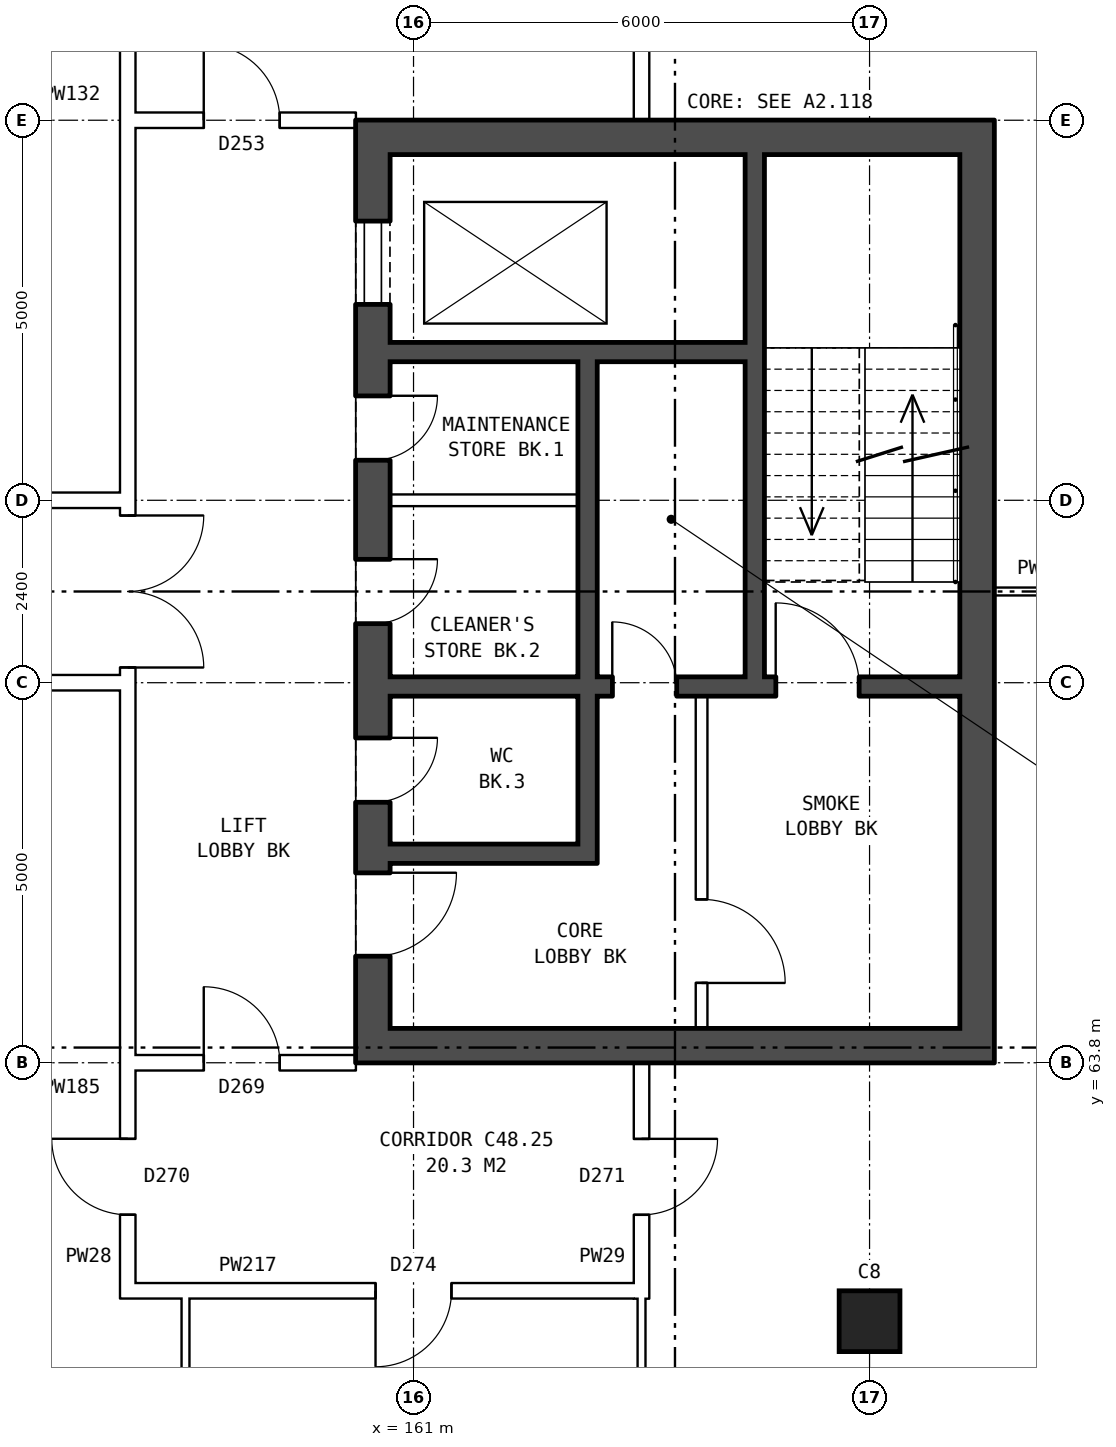
"""IFC4 building model, lengths in metres.
Left out: names, types, materials, properties, quantities, classifications, styles, units other than length and angle.
Written with IfcOpenShell. Run it as: python <this file> out.ifc"""

import sys

from ifc_helpers import new_model, si_unit, direction, frame, frame_2d, origin, origin_2d, place, context, subcontext, project, spatial, rectangle, extrude, element, fill, save


model = new_model("IFC4")
c1 = context("Model", 3, precision=1e-05, world=origin(), true_north=direction((0.0, 1.0)))
c2 = subcontext(c1, "Body", "Model", "MODEL_VIEW")
j1 = project(units=[si_unit("LENGTHUNIT", "METRE"), si_unit("PLANEANGLEUNIT", "RADIAN")], contexts=[c1])
p1 = place(None, origin())
s1 = spatial("IfcSite", under=j1, at=p1, CompositionType="ELEMENT")
p2 = place(p1, origin())
s2 = spatial("IfcBuilding", under=s1, at=p2, CompositionType="ELEMENT")
p3 = place(p2, frame((0.0, 0.0, 171.6)))
s3 = spatial("IfcBuildingStorey", under=s2, at=p3, CompositionType="ELEMENT", Elevation=171.6)
p4 = place(p3, frame((167.0, 60.4, 0.0), z_axis=(0.0, 0.0, 1.0), x_axis=(1.0, 0.0, 0.0)))
e1 = element("IfcColumn", 1, at=p4, inside=s3, PredefinedType="COLUMN", context=c2, shape_type="SweptSolid", body=[
    extrude(rectangle(XDim=0.8, YDim=0.8, at=origin_2d()), origin(), (0.0, 0.0, 1.0), 3.6),
])
p5 = place(p3, frame((160.465, 76.2, 0.0), z_axis=(0.0, 0.0, 1.0), x_axis=(0.0, -1.0, 0.0)))
e2 = element("IfcWall", 2, at=p5, inside=s3, PredefinedType="SHEAR", context=c2, shape_type="SweptSolid", body=[
    extrude(rectangle(XDim=12.4, YDim=0.45, at=frame_2d((6.2, 0.0))), origin(), (0.0, 0.0, 1.0), 3.6),
])
p6 = place(p5, frame((1.325, 0.0, 0.0)))
e3 = element("IfcOpeningElement", 3, at=p6, cuts=e2, PredefinedType="OPENING", context=c2, shape_type="SweptSolid", body=[
    extrude(rectangle(XDim=1.1, YDim=2.1, at=frame_2d((0.55, 1.05))), frame((0.0, 0.235, 0.0), z_axis=(0.0, -1.0, 0.0), x_axis=(1.0, 0.0, 0.0)), (0.0, 0.0, 1.0), 0.47),
])
p7 = place(p5, frame((3.625, 0.0, 0.0)))
e4 = element("IfcOpeningElement", 4, at=p7, cuts=e2, PredefinedType="OPENING", context=c2, shape_type="SweptSolid", body=[
    extrude(rectangle(XDim=0.85, YDim=2.1, at=frame_2d((0.425, 1.05))), frame((0.0, 0.235, 0.0), z_axis=(0.0, -1.0, 0.0), x_axis=(1.0, 0.0, 0.0)), (0.0, 0.0, 1.0), 0.47),
])
p8 = place(p5, frame((5.775, 0.0, 0.0)))
e5 = element("IfcOpeningElement", 5, at=p8, cuts=e2, PredefinedType="OPENING", context=c2, shape_type="SweptSolid", body=[
    extrude(rectangle(XDim=0.85, YDim=2.1, at=frame_2d((0.425, 1.05))), frame((0.0, 0.235, 0.0), z_axis=(0.0, -1.0, 0.0), x_axis=(1.0, 0.0, 0.0)), (0.0, 0.0, 1.0), 0.47),
])
p9 = place(p5, frame((9.9, 0.0, 0.0)))
e6 = element("IfcOpeningElement", 6, at=p9, cuts=e2, PredefinedType="OPENING", context=c2, shape_type="SweptSolid", body=[
    extrude(rectangle(XDim=1.1, YDim=2.1, at=frame_2d((0.55, 1.05))), frame((0.0, 0.235, 0.0), z_axis=(0.0, -1.0, 0.0), x_axis=(1.0, 0.0, 0.0)), (0.0, 0.0, 1.0), 0.47),
])
p10 = place(p5, frame((8.125, 0.0, 0.0)))
e7 = element("IfcOpeningElement", 7, at=p10, cuts=e2, PredefinedType="OPENING", context=c2, shape_type="SweptSolid", body=[
    extrude(rectangle(XDim=0.85, YDim=2.1, at=frame_2d((0.425, 1.05))), frame((0.0, 0.235, 0.0), z_axis=(0.0, -1.0, 0.0), x_axis=(1.0, 0.0, 0.0)), (0.0, 0.0, 1.0), 0.47),
])
p11 = place(p3, frame((168.415, 76.2, 0.0), z_axis=(0.0, 0.0, 1.0), x_axis=(0.0, -1.0, 0.0)))
e8 = element("IfcWall", 8, at=p11, inside=s3, PredefinedType="SHEAR", context=c2, shape_type="SweptSolid", body=[
    extrude(rectangle(XDim=12.4, YDim=0.45, at=frame_2d((6.2, 0.0))), origin(), (0.0, 0.0, 1.0), 3.6),
])
for number, where, z_axis, x_axis in (
    (9, (160.69, 75.975, 0.0), (0.0, 0.0, 1.0), (1.0, 0.0, 0.0)),
    (10, (160.69, 64.025, 0.0), (0.0, 0.0, 1.0), (1.0, 0.0, 0.0)),
):
    element("IfcWall", number, at=place(p3, frame(where, z_axis=z_axis, x_axis=x_axis)), inside=s3, PredefinedType="SHEAR", context=c2, shape_type="SweptSolid", body=[
        extrude(rectangle(XDim=7.5, YDim=0.45, at=frame_2d((3.75, 0.0))), origin(), (0.0, 0.0, 1.0), 3.6),
    ])
p12 = place(p3, frame((160.69, 73.15, 0.0), z_axis=(0.0, 0.0, 1.0), x_axis=(1.0, 0.0, 0.0)))
e11 = element("IfcWall", 11, at=p12, inside=s3, PredefinedType="SHEAR", context=c2, shape_type="SweptSolid", body=[
    extrude(rectangle(XDim=4.675, YDim=0.25, at=frame_2d((2.337, 0.0))), origin(), (0.0, 0.0, 1.0), 3.6),
])
p13 = place(p3, frame((160.69, 71.2, 0.0), z_axis=(0.0, 0.0, 1.0), x_axis=(1.0, 0.0, 0.0)))
e12 = element("IfcWall", 12, at=p13, inside=s3, PredefinedType="PARTITIONING", context=c2, shape_type="SweptSolid", body=[
    extrude(rectangle(XDim=2.475, YDim=0.15, at=frame_2d((1.238, 0.0))), origin(), (0.0, 0.0, 1.0), 3.6),
])
p14 = place(p3, frame((160.69, 68.75, 0.0), z_axis=(0.0, 0.0, 1.0), x_axis=(1.0, 0.0, 0.0)))
e13 = element("IfcWall", 13, at=p14, inside=s3, PredefinedType="SHEAR", context=c2, shape_type="SweptSolid", body=[
    extrude(rectangle(XDim=7.5, YDim=0.25, at=frame_2d((3.75, 0.0))), origin(), (0.0, 0.0, 1.0), 3.6),
])
p15 = place(p14, frame((5.075, 0.0, 0.0)))
e14 = element("IfcOpeningElement", 14, at=p15, cuts=e13, PredefinedType="OPENING", context=c2, shape_type="SweptSolid", body=[
    extrude(rectangle(XDim=1.1, YDim=2.1, at=frame_2d((0.55, 1.05))), frame((0.0, 0.135, 0.0), z_axis=(0.0, -1.0, 0.0), x_axis=(1.0, 0.0, 0.0)), (0.0, 0.0, 1.0), 0.27),
])
p16 = place(p14, frame((2.925, 0.0, 0.0)))
e15 = element("IfcOpeningElement", 15, at=p16, cuts=e13, PredefinedType="OPENING", context=c2, shape_type="SweptSolid", body=[
    extrude(rectangle(XDim=0.85, YDim=2.1, at=frame_2d((0.425, 1.05))), frame((0.0, 0.135, 0.0), z_axis=(0.0, -1.0, 0.0), x_axis=(1.0, 0.0, 0.0)), (0.0, 0.0, 1.0), 0.27),
])
p17 = place(p3, frame((160.69, 66.55, 0.0), z_axis=(0.0, 0.0, 1.0), x_axis=(1.0, 0.0, 0.0)))
e16 = element("IfcWall", 16, at=p17, inside=s3, PredefinedType="SHEAR", context=c2, shape_type="SweptSolid", body=[
    extrude(rectangle(XDim=2.475, YDim=0.25, at=frame_2d((1.238, 0.0))), origin(), (0.0, 0.0, 1.0), 3.6),
])
p18 = place(p3, frame((163.29, 73.025, 0.0), z_axis=(0.0, 0.0, 1.0), x_axis=(0.0, -1.0, 0.0)))
e17 = element("IfcWall", 17, at=p18, inside=s3, PredefinedType="SHEAR", context=c2, shape_type="SweptSolid", body=[
    extrude(rectangle(XDim=4.15, YDim=0.25, at=frame_2d((2.075, 0.0))), origin(), (0.0, 0.0, 1.0), 3.6),
])
p19 = place(p3, frame((163.29, 68.625, 0.0), z_axis=(0.0, 0.0, 1.0), x_axis=(0.0, -1.0, 0.0)))
e18 = element("IfcWall", 18, at=p19, inside=s3, PredefinedType="SHEAR", context=c2, shape_type="SweptSolid", body=[
    extrude(rectangle(XDim=2.2, YDim=0.25, at=frame_2d((1.1, 0.0))), origin(), (0.0, 0.0, 1.0), 3.6),
])
p20 = place(p3, frame((164.79, 68.625, 0.0), z_axis=(0.0, 0.0, 1.0), x_axis=(0.0, -1.0, 0.0)))
e19 = element("IfcWall", 19, at=p20, inside=s3, PredefinedType="PARTITIONING", context=c2, shape_type="SweptSolid", body=[
    extrude(rectangle(XDim=4.375, YDim=0.15, at=frame_2d((2.188, 0.0))), origin(), (0.0, 0.0, 1.0), 3.6),
])
p21 = place(p20, frame((2.675, 0.0, 0.0)))
e20 = element("IfcOpeningElement", 20, at=p21, cuts=e19, PredefinedType="OPENING", context=c2, shape_type="SweptSolid", body=[
    extrude(rectangle(XDim=1.1, YDim=2.1, at=frame_2d((0.55, 1.05))), frame((0.0, 0.085, 0.0), z_axis=(0.0, -1.0, 0.0), x_axis=(1.0, 0.0, 0.0)), (0.0, 0.0, 1.0), 0.17),
])
p22 = place(p3, frame((165.49, 75.75, 0.0), z_axis=(0.0, 0.0, 1.0), x_axis=(0.0, -1.0, 0.0)))
e21 = element("IfcWall", 21, at=p22, inside=s3, PredefinedType="SHEAR", context=c2, shape_type="SweptSolid", body=[
    extrude(rectangle(XDim=6.875, YDim=0.25, at=frame_2d((3.438, 0.0))), origin(), (0.0, 0.0, 1.0), 3.6),
])
p23 = place(p3, frame((157.24, 63.9, 0.0), z_axis=(0.0, 0.0, 1.0), x_axis=(0.0, 1.0, 0.0)))
e22 = element("IfcWall", 22, at=p23, inside=s3, PredefinedType="PARTITIONING", context=c2, shape_type="SweptSolid", body=[
    extrude(rectangle(XDim=12.2, YDim=0.2, at=frame_2d((6.1, 0.0))), origin(), (0.0, 0.0, 1.0), 3.6),
])
p24 = place(p23, frame((5.1, 0.0, 0.0)))
e23 = element("IfcOpeningElement", 23, at=p24, cuts=e22, PredefinedType="OPENING", context=c2, shape_type="SweptSolid", body=[
    extrude(rectangle(XDim=2.0, YDim=2.1, at=frame_2d((1.0, 1.05))), frame((0.0, 0.11, 0.0), z_axis=(0.0, -1.0, 0.0), x_axis=(1.0, 0.0, 0.0)), (0.0, 0.0, 1.0), 0.22),
])
p25 = place(p3, frame((157.14, 60.8, 0.0), z_axis=(0.0, 0.0, 1.0), x_axis=(1.0, 0.0, 0.0)))
e24 = element("IfcWall", 24, at=p25, inside=s3, PredefinedType="PARTITIONING", context=c2, shape_type="SweptSolid", body=[
    extrude(rectangle(XDim=6.96, YDim=0.2, at=frame_2d((3.48, 0.0))), origin(), (0.0, 0.0, 1.0), 3.6),
])
p26 = place(p25, frame((3.36, 0.0, 0.0)))
e25 = element("IfcOpeningElement", 25, at=p26, cuts=e24, PredefinedType="OPENING", context=c2, shape_type="SweptSolid", body=[
    extrude(rectangle(XDim=1.0, YDim=2.1, at=frame_2d((0.5, 1.05))), frame((0.0, 0.11, 0.0), z_axis=(0.0, -1.0, 0.0), x_axis=(1.0, 0.0, 0.0)), (0.0, 0.0, 1.0), 0.22),
])
p27 = place(p3, frame((157.14, 63.8, 0.0), z_axis=(0.0, 0.0, 1.0), x_axis=(1.0, 0.0, 0.0)))
e26 = element("IfcWall", 26, at=p27, inside=s3, PredefinedType="PARTITIONING", context=c2, shape_type="SweptSolid", body=[
    extrude(rectangle(XDim=3.1, YDim=0.2, at=frame_2d((1.55, 0.0))), origin(), (0.0, 0.0, 1.0), 3.6),
])
p28 = place(p27, frame((1.1, 0.0, 0.0)))
e27 = element("IfcOpeningElement", 27, at=p28, cuts=e26, PredefinedType="OPENING", context=c2, shape_type="SweptSolid", body=[
    extrude(rectangle(XDim=1.0, YDim=2.1, at=frame_2d((0.5, 1.05))), frame((0.0, 0.11, 0.0), z_axis=(0.0, -1.0, 0.0), x_axis=(1.0, 0.0, 0.0)), (0.0, 0.0, 1.0), 0.22),
])
p29 = place(p3, frame((142.76, 68.8, 0.0), z_axis=(0.0, 0.0, 1.0), x_axis=(1.0, 0.0, 0.0)))
e28 = element("IfcWall", 28, at=p29, inside=s3, PredefinedType="PARTITIONING", context=c2, shape_type="SweptSolid", body=[
    extrude(rectangle(XDim=14.48, YDim=0.2, at=frame_2d((7.24, 0.0))), origin(), (0.0, 0.0, 1.0), 3.6),
])
p30 = place(p29, frame((3.02, 0.0, 0.0)))
e29 = element("IfcOpeningElement", 29, at=p30, cuts=e28, PredefinedType="OPENING", context=c2, shape_type="SweptSolid", body=[
    extrude(rectangle(XDim=1.2, YDim=2.1, at=frame_2d((0.6, 1.05))), frame((0.0, 0.11, 0.0), z_axis=(0.0, -1.0, 0.0), x_axis=(1.0, 0.0, 0.0)), (0.0, 0.0, 1.0), 0.22),
])
p31 = place(p3, frame((168.64, 70.0, 0.0), z_axis=(0.0, 0.0, 1.0), x_axis=(1.0, 0.0, 0.0)))
e30 = element("IfcWall", 30, at=p31, inside=s3, PredefinedType="PARTITIONING", context=c2, shape_type="SweptSolid", body=[
    extrude(rectangle(XDim=1.37, YDim=0.1, at=frame_2d((0.685, 0.0))), origin(), (0.0, 0.0, 1.0), 3.6),
])
p32 = place(p3, frame((142.76, 71.2, 0.0), z_axis=(0.0, 0.0, 1.0), x_axis=(1.0, 0.0, 0.0)))
e31 = element("IfcWall", 31, at=p32, inside=s3, PredefinedType="PARTITIONING", context=c2, shape_type="SweptSolid", body=[
    extrude(rectangle(XDim=14.48, YDim=0.2, at=frame_2d((7.24, 0.0))), origin(), (0.0, 0.0, 1.0), 3.6),
])
p33 = place(p3, frame((157.14, 76.2, 0.0), z_axis=(0.0, 0.0, 1.0), x_axis=(1.0, 0.0, 0.0)))
e32 = element("IfcWall", 32, at=p33, inside=s3, PredefinedType="PARTITIONING", context=c2, shape_type="SweptSolid", body=[
    extrude(rectangle(XDim=3.1, YDim=0.2, at=frame_2d((1.55, 0.0))), origin(), (0.0, 0.0, 1.0), 3.6),
])
p34 = place(p33, frame((1.1, 0.0, 0.0)))
e33 = element("IfcOpeningElement", 33, at=p34, cuts=e32, PredefinedType="OPENING", context=c2, shape_type="SweptSolid", body=[
    extrude(rectangle(XDim=1.0, YDim=2.1, at=frame_2d((0.5, 1.05))), frame((0.0, 0.11, 0.0), z_axis=(0.0, -1.0, 0.0), x_axis=(1.0, 0.0, 0.0)), (0.0, 0.0, 1.0), 0.22),
])
p35 = place(p3, frame((157.24, 60.7, 0.0), z_axis=(0.0, 0.0, 1.0), x_axis=(0.0, 1.0, 0.0)))
e34 = element("IfcWall", 34, at=p35, inside=s3, PredefinedType="PARTITIONING", context=c2, shape_type="SweptSolid", body=[
    extrude(rectangle(XDim=3.2, YDim=0.2, at=frame_2d((1.6, 0.0))), origin(), (0.0, 0.0, 1.0), 3.6),
])
p36 = place(p35, frame((1.1, 0.0, 0.0)))
e35 = element("IfcOpeningElement", 35, at=p36, cuts=e34, PredefinedType="OPENING", context=c2, shape_type="SweptSolid", body=[
    extrude(rectangle(XDim=1.0, YDim=2.1, at=frame_2d((0.5, 1.05))), frame((0.0, 0.11, 0.0), z_axis=(0.0, -1.0, 0.0), x_axis=(1.0, 0.0, 0.0)), (0.0, 0.0, 1.0), 0.22),
])
p37 = place(p3, frame((157.24, 76.1, 0.0), z_axis=(0.0, 0.0, 1.0), x_axis=(0.0, 1.0, 0.0)))
e36 = element("IfcWall", 36, at=p37, inside=s3, PredefinedType="PARTITIONING", context=c2, shape_type="SweptSolid", body=[
    extrude(rectangle(XDim=3.2, YDim=0.2, at=frame_2d((1.6, 0.0))), origin(), (0.0, 0.0, 1.0), 3.6),
])
p38 = place(p37, frame((1.1, 0.0, 0.0)))
e37 = element("IfcOpeningElement", 37, at=p38, cuts=e36, PredefinedType="OPENING", context=c2, shape_type="SweptSolid", body=[
    extrude(rectangle(XDim=1.0, YDim=2.1, at=frame_2d((0.5, 1.05))), frame((0.0, 0.11, 0.0), z_axis=(0.0, -1.0, 0.0), x_axis=(1.0, 0.0, 0.0)), (0.0, 0.0, 1.0), 0.22),
])
p39 = place(p3, frame((158.0, 54.24, 0.0), z_axis=(0.0, 0.0, 1.0), x_axis=(0.0, 1.0, 0.0)))
e38 = element("IfcWall", 38, at=p39, inside=s3, PredefinedType="PARTITIONING", context=c2, shape_type="SweptSolid", body=[
    extrude(rectangle(XDim=6.66, YDim=0.1, at=frame_2d((3.33, 0.0))), origin(), (0.0, 0.0, 1.0), 3.6),
])
p40 = place(p3, frame((164.0, 60.698, 0.0), z_axis=(0.0, 0.0, 1.0), x_axis=(0.0, 1.0, 0.0)))
e39 = element("IfcWall", 39, at=p40, inside=s3, PredefinedType="PARTITIONING", context=c2, shape_type="SweptSolid", body=[
    extrude(rectangle(XDim=3.102, YDim=0.2, at=frame_2d((1.551, 0.0))), origin(), (0.0, 0.0, 1.0), 3.6),
])
p41 = place(p40, frame((1.101, 0.0, 0.0)))
e40 = element("IfcOpeningElement", 40, at=p41, cuts=e39, PredefinedType="OPENING", context=c2, shape_type="SweptSolid", body=[
    extrude(rectangle(XDim=1.0, YDim=2.1, at=frame_2d((0.5, 1.05))), frame((0.0, 0.11, 0.0), z_axis=(0.0, -1.0, 0.0), x_axis=(1.0, 0.0, 0.0)), (0.0, 0.0, 1.0), 0.22),
])
p42 = place(p3, frame((164.0, 76.2, 0.0), z_axis=(0.0, 0.0, 1.0), x_axis=(0.0, 1.0, 0.0)))
e41 = element("IfcWall", 41, at=p42, inside=s3, PredefinedType="PARTITIONING", context=c2, shape_type="SweptSolid", body=[
    extrude(rectangle(XDim=3.102, YDim=0.2, at=frame_2d((1.551, 0.0))), origin(), (0.0, 0.0, 1.0), 3.6),
])
p43 = place(p42, frame((1.001, 0.0, 0.0)))
e42 = element("IfcOpeningElement", 42, at=p43, cuts=e41, PredefinedType="OPENING", context=c2, shape_type="SweptSolid", body=[
    extrude(rectangle(XDim=1.0, YDim=2.1, at=frame_2d((0.5, 1.05))), frame((0.0, 0.11, 0.0), z_axis=(0.0, -1.0, 0.0), x_axis=(1.0, 0.0, 0.0)), (0.0, 0.0, 1.0), 0.22),
])
p44 = place(p3, frame((164.0, 54.24, 0.0), z_axis=(0.0, 0.0, 1.0), x_axis=(0.0, 1.0, 0.0)))
e43 = element("IfcWall", 43, at=p44, inside=s3, PredefinedType="PARTITIONING", context=c2, shape_type="SweptSolid", body=[
    extrude(rectangle(XDim=6.662, YDim=0.1, at=frame_2d((3.331, 0.0))), origin(), (0.0, 0.0, 1.0), 3.6),
])
p45 = place(p6, origin())
e44 = element("IfcDoor", 44, at=p45, inside=s3, OperationType="DOUBLE_DOOR_SLIDING", PredefinedType="DOOR", context=c2, shape_type="SweptSolid", body=[
    extrude(rectangle(XDim=1.1, YDim=2.1, at=frame_2d((0.55, 1.05))), frame((0.0, 0.21, 0.0), z_axis=(0.0, -1.0, 0.0), x_axis=(1.0, 0.0, 0.0)), (0.0, 0.0, 1.0), 0.05),
])
fill(e3, e44)
p46 = place(p7, origin())
e45 = element("IfcDoor", 45, at=p46, inside=s3, OperationType="SINGLE_SWING_LEFT", PredefinedType="DOOR", context=c2, shape_type="SweptSolid", body=[
    extrude(rectangle(XDim=0.85, YDim=2.1, at=frame_2d((0.425, 1.05))), frame((0.0, 0.21, 0.0), z_axis=(0.0, -1.0, 0.0), x_axis=(1.0, 0.0, 0.0)), (0.0, 0.0, 1.0), 0.05),
])
fill(e4, e45)
p47 = place(p8, origin())
e46 = element("IfcDoor", 46, at=p47, inside=s3, OperationType="SINGLE_SWING_LEFT", PredefinedType="DOOR", context=c2, shape_type="SweptSolid", body=[
    extrude(rectangle(XDim=0.85, YDim=2.1, at=frame_2d((0.425, 1.05))), frame((0.0, 0.21, 0.0), z_axis=(0.0, -1.0, 0.0), x_axis=(1.0, 0.0, 0.0)), (0.0, 0.0, 1.0), 0.05),
])
fill(e5, e46)
p48 = place(p9, origin())
e47 = element("IfcDoor", 47, at=p48, inside=s3, OperationType="SINGLE_SWING_LEFT", PredefinedType="DOOR", context=c2, shape_type="SweptSolid", body=[
    extrude(rectangle(XDim=1.1, YDim=2.1, at=frame_2d((0.55, 1.05))), frame((0.0, 0.21, 0.0), z_axis=(0.0, -1.0, 0.0), x_axis=(1.0, 0.0, 0.0)), (0.0, 0.0, 1.0), 0.05),
])
fill(e6, e47)
p49 = place(p21, origin())
e48 = element("IfcDoor", 48, at=p49, inside=s3, OperationType="SINGLE_SWING_RIGHT", PredefinedType="DOOR", context=c2, shape_type="SweptSolid", body=[
    extrude(rectangle(XDim=1.1, YDim=2.1, at=frame_2d((0.55, 1.05))), frame((0.0, 0.025, 0.0), z_axis=(0.0, -1.0, 0.0), x_axis=(1.0, 0.0, 0.0)), (0.0, 0.0, 1.0), 0.05),
])
fill(e20, e48)
p50 = place(p15, origin())
e49 = element("IfcDoor", 49, at=p50, inside=s3, OperationType="SINGLE_SWING_LEFT", PredefinedType="DOOR", context=c2, shape_type="SweptSolid", body=[
    extrude(rectangle(XDim=1.1, YDim=2.1, at=frame_2d((0.55, 1.05))), frame((0.0, 0.025, 0.0), z_axis=(0.0, -1.0, 0.0), x_axis=(1.0, 0.0, 0.0)), (0.0, 0.0, 1.0), 0.05),
])
fill(e14, e49)
p51 = place(p10, origin())
e50 = element("IfcDoor", 50, at=p51, inside=s3, OperationType="SINGLE_SWING_LEFT", PredefinedType="DOOR", context=c2, shape_type="SweptSolid", body=[
    extrude(rectangle(XDim=0.85, YDim=2.1, at=frame_2d((0.425, 1.05))), frame((0.0, 0.21, 0.0), z_axis=(0.0, -1.0, 0.0), x_axis=(1.0, 0.0, 0.0)), (0.0, 0.0, 1.0), 0.05),
])
fill(e7, e50)
p52 = place(p16, origin())
e51 = element("IfcDoor", 51, at=p52, inside=s3, OperationType="SINGLE_SWING_LEFT", PredefinedType="DOOR", context=c2, shape_type="SweptSolid", body=[
    extrude(rectangle(XDim=0.85, YDim=2.1, at=frame_2d((0.425, 1.05))), frame((0.0, 0.025, 0.0), z_axis=(0.0, -1.0, 0.0), x_axis=(1.0, 0.0, 0.0)), (0.0, 0.0, 1.0), 0.05),
])
fill(e15, e51)
p53 = place(p24, frame((2.0, 0.0, 0.0), z_axis=(0.0, 0.0, 1.0), x_axis=(-1.0, 0.0, 0.0)))
e52 = element("IfcDoor", 52, at=p53, inside=s3, OperationType="DOUBLE_DOOR_SINGLE_SWING", PredefinedType="DOOR", context=c2, shape_type="SweptSolid", body=[
    extrude(rectangle(XDim=2.0, YDim=2.1, at=frame_2d((1.0, 1.05))), frame((0.0, 0.025, 0.0), z_axis=(0.0, -1.0, 0.0), x_axis=(1.0, 0.0, 0.0)), (0.0, 0.0, 1.0), 0.05),
])
fill(e23, e52)
p54 = place(p26, frame((1.0, 0.0, 0.0), z_axis=(0.0, 0.0, 1.0), x_axis=(-1.0, 0.0, 0.0)))
e53 = element("IfcDoor", 53, at=p54, inside=s3, OperationType="SINGLE_SWING_RIGHT", PredefinedType="DOOR", context=c2, shape_type="SweptSolid", body=[
    extrude(rectangle(XDim=1.0, YDim=2.1, at=frame_2d((0.5, 1.05))), frame((0.0, 0.025, 0.0), z_axis=(0.0, -1.0, 0.0), x_axis=(1.0, 0.0, 0.0)), (0.0, 0.0, 1.0), 0.05),
])
fill(e25, e53)
p55 = place(p28, origin())
e54 = element("IfcDoor", 54, at=p55, inside=s3, OperationType="SINGLE_SWING_LEFT", PredefinedType="DOOR", context=c2, shape_type="SweptSolid", body=[
    extrude(rectangle(XDim=1.0, YDim=2.1, at=frame_2d((0.5, 1.05))), frame((0.0, 0.025, 0.0), z_axis=(0.0, -1.0, 0.0), x_axis=(1.0, 0.0, 0.0)), (0.0, 0.0, 1.0), 0.05),
])
fill(e27, e54)
p56 = place(p34, origin())
e55 = element("IfcDoor", 55, at=p56, inside=s3, OperationType="SINGLE_SWING_LEFT", PredefinedType="DOOR", context=c2, shape_type="SweptSolid", body=[
    extrude(rectangle(XDim=1.0, YDim=2.1, at=frame_2d((0.5, 1.05))), frame((0.0, 0.025, 0.0), z_axis=(0.0, -1.0, 0.0), x_axis=(1.0, 0.0, 0.0)), (0.0, 0.0, 1.0), 0.05),
])
fill(e33, e55)
p57 = place(p36, origin())
e56 = element("IfcDoor", 56, at=p57, inside=s3, OperationType="SINGLE_SWING_RIGHT", PredefinedType="DOOR", context=c2, shape_type="SweptSolid", body=[
    extrude(rectangle(XDim=1.0, YDim=2.1, at=frame_2d((0.5, 1.05))), frame((0.0, 0.025, 0.0), z_axis=(0.0, -1.0, 0.0), x_axis=(1.0, 0.0, 0.0)), (0.0, 0.0, 1.0), 0.05),
])
fill(e35, e56)
p58 = place(p41, frame((1.0, 0.0, 0.0), z_axis=(0.0, 0.0, 1.0), x_axis=(-1.0, 0.0, 0.0)))
e57 = element("IfcDoor", 57, at=p58, inside=s3, OperationType="SINGLE_SWING_LEFT", PredefinedType="DOOR", context=c2, shape_type="SweptSolid", body=[
    extrude(rectangle(XDim=1.0, YDim=2.1, at=frame_2d((0.5, 1.05))), frame((0.0, 0.025, 0.0), z_axis=(0.0, -1.0, 0.0), x_axis=(1.0, 0.0, 0.0)), (0.0, 0.0, 1.0), 0.05),
])
fill(e40, e57)
save(model, sys.argv[1])
